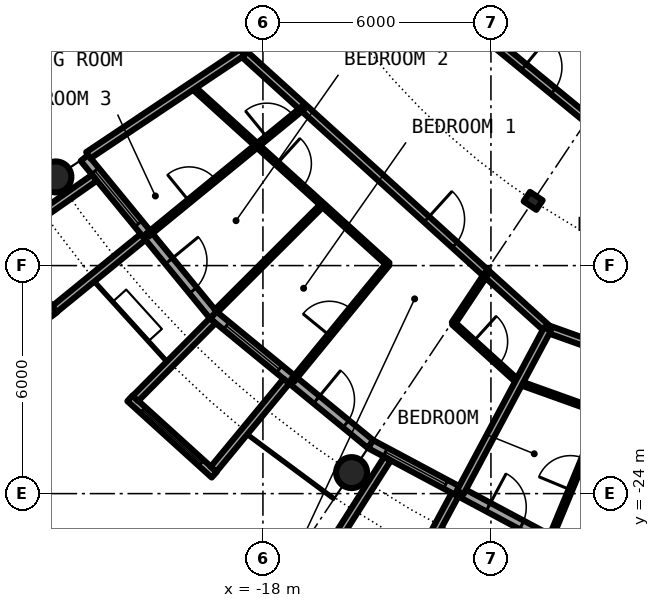
"""IFC4 building model, lengths in metres.
Left out: names, types, materials, properties, quantities, classifications, styles, units other than length and angle.
Written with IfcOpenShell. Run it as: python <this file> out.ifc"""

import sys

from ifc_helpers import new_model, si_unit, direction, frame, frame_2d, origin, origin_2d, place, context, subcontext, project, spatial, rectangle, circle, hollow_circle, i_section, extrude, element, fill, save


model = new_model("IFC4")
c1 = context("Model", 3, precision=1e-05, world=origin(), true_north=direction((0.0, 1.0)))
c2 = subcontext(c1, "Body", "Model", "MODEL_VIEW")
j1 = project(units=[si_unit("LENGTHUNIT", "METRE"), si_unit("PLANEANGLEUNIT", "RADIAN")], contexts=[c1])
p1 = place(None, origin())
s1 = spatial("IfcSite", under=j1, at=p1, CompositionType="ELEMENT")
p2 = place(p1, origin())
s2 = spatial("IfcBuilding", under=s1, at=p2, CompositionType="ELEMENT")
p3 = place(p2, frame((0.0, 0.0, 202.4)))
s3 = spatial("IfcBuildingStorey", under=s2, at=p3, CompositionType="ELEMENT", Elevation=202.4)
for number, where, z_axis, x_axis in (
    (1, (-23.448, -15.667, 0.0), (0.0, 0.0, 1.0), (1.0, 0.0, 0.0)),
    (2, (-15.667, -23.448, 0.0), (0.0, 0.0, 1.0), (1.0, 0.0, 0.0)),
):
    element("IfcColumn", number, at=place(p3, frame(where, z_axis=z_axis, x_axis=x_axis)), inside=s3, PredefinedType="COLUMN", context=c2, shape_type="SweptSolid", body=[
        extrude(hollow_circle(Radius=0.406, WallThickness=0.03, at=origin_2d()), origin(), (0.0, 0.0, 1.0), 3.05),
    ])
p4 = place(p3, frame((-10.889, -16.297, 0.0), z_axis=(0.0, 0.0, 1.0), x_axis=(-0.55557023302, -0.831469612303, 0.0)))
e3 = element("IfcColumn", 3, at=p4, inside=s3, PredefinedType="COLUMN", context=c2, shape_type="SweptSolid", body=[
    extrude(i_section(OverallWidth=0.3, OverallDepth=0.4, WebThickness=0.013, FlangeThickness=0.024, FilletRadius=0.027, at=origin_2d()), origin(), (0.0, 0.0, 1.0), 3.05),
])
p5 = place(p3, frame((-22.699, -15.167, 0.0), z_axis=(0.0, 0.0, 1.0), x_axis=(0.634382322723, -0.773019449054, 0.0)))
e4 = element("IfcWall", 4, at=p5, inside=s3, PredefinedType="SOLIDWALL", context=c2, shape_type="SweptSolid", body=[
    extrude(rectangle(XDim=5.352, YDim=0.25, at=frame_2d((2.676, 0.0))), origin(), (0.0, 0.0, 1.0), 2.7),
])
p6 = place(p5, frame((0.441, 0.0, 0.3)))
e5 = element("IfcOpeningElement", 5, at=p6, cuts=e4, PredefinedType="OPENING", context=c2, shape_type="SweptSolid", body=[
    extrude(rectangle(XDim=1.8, YDim=2.1, at=frame_2d((0.9, 1.05))), frame((0.0, 0.135, 0.0), z_axis=(0.0, -1.0, 0.0), x_axis=(1.0, 0.0, 0.0)), (0.0, 0.0, 1.0), 0.27),
])
p7 = place(p5, frame((3.51, 0.0, 0.0)))
e6 = element("IfcOpeningElement", 6, at=p7, cuts=e4, PredefinedType="OPENING", context=c2, shape_type="SweptSolid", body=[
    extrude(rectangle(XDim=1.0, YDim=2.2, at=frame_2d((0.5, 1.1))), frame((0.0, 0.135, 0.0), z_axis=(0.0, -1.0, 0.0), x_axis=(1.0, 0.0, 0.0)), (0.0, 0.0, 1.0), 0.27),
])
p8 = place(p3, frame((-24.972, -17.337, -0.03), z_axis=(0.0, 0.0, 1.0), x_axis=(0.602806268067, -0.797887588059, 0.0)))
e7 = element("IfcWall", 7, at=p8, inside=s3, PredefinedType="SOLIDWALL", context=c2, shape_type="SweptSolid", body=[
    extrude(rectangle(XDim=2.447, YDim=0.2, at=frame_2d((1.223, 0.0))), origin(), (0.0, 0.0, 1.0), 2.73),
])
p9 = place(p8, frame((0.183, 0.0, 0.33)))
e8 = element("IfcOpeningElement", 8, at=p9, cuts=e7, PredefinedType="OPENING", context=c2, shape_type="SweptSolid", body=[
    extrude(circle(Radius=1.04, at=frame_2d((1.04, 1.04))), frame((0.0, 0.11, 0.0), z_axis=(0.0, -1.0, 0.0), x_axis=(1.0, 0.0, 0.0)), (0.0, 0.0, 1.0), 0.22),
])
p10 = place(p3, frame((-22.433, -15.688, -0.03), z_axis=(0.0, 0.0, 1.0), x_axis=(-0.819373043115, -0.573260687834, 0.0)))
e9 = element("IfcWall", 9, at=p10, inside=s3, PredefinedType="SOLIDWALL", context=c2, shape_type="SweptSolid", body=[
    extrude(rectangle(XDim=2.925, YDim=0.2, at=frame_2d((1.463, 0.0))), origin(), (0.0, 0.0, 1.0), 2.73),
])
p11 = place(p3, frame((-21.155, -17.246, -0.03), z_axis=(0.0, 0.0, 1.0), x_axis=(-0.775179004516, -0.631741648902, 0.0)))
e10 = element("IfcWall", 10, at=p11, inside=s3, PredefinedType="SOLIDWALL", context=c2, shape_type="SweptSolid", body=[
    extrude(rectangle(XDim=3.006, YDim=0.2, at=frame_2d((1.503, 0.0))), origin(), (0.0, 0.0, 1.0), 2.73),
])
p12 = place(p3, frame((-19.304, -19.304, 0.0), z_axis=(0.0, 0.0, 1.0), x_axis=(0.773019449054, -0.634382322723, 0.0)))
e11 = element("IfcWall", 11, at=p12, inside=s3, PredefinedType="SOLIDWALL", context=c2, shape_type="SweptSolid", body=[
    extrude(rectangle(XDim=5.352, YDim=0.25, at=frame_2d((2.676, 0.0))), origin(), (0.0, 0.0, 1.0), 2.7),
])
p13 = place(p12, frame((0.441, 0.0, 0.3)))
e12 = element("IfcOpeningElement", 12, at=p13, cuts=e11, PredefinedType="OPENING", context=c2, shape_type="SweptSolid", body=[
    extrude(rectangle(XDim=1.8, YDim=2.1, at=frame_2d((0.9, 1.05))), frame((0.0, 0.135, 0.0), z_axis=(0.0, -1.0, 0.0), x_axis=(1.0, 0.0, 0.0)), (0.0, 0.0, 1.0), 0.27),
])
p14 = place(p12, frame((3.51, 0.0, 0.0)))
e13 = element("IfcOpeningElement", 13, at=p14, cuts=e11, PredefinedType="OPENING", context=c2, shape_type="SweptSolid", body=[
    extrude(rectangle(XDim=1.0, YDim=2.2, at=frame_2d((0.5, 1.1))), frame((0.0, 0.135, 0.0), z_axis=(0.0, -1.0, 0.0), x_axis=(1.0, 0.0, 0.0)), (0.0, 0.0, 1.0), 0.27),
])
p15 = place(p3, frame((-21.5, -21.493, -0.03), z_axis=(0.0, 0.0, 1.0), x_axis=(0.740998365753, -0.671506829416, 0.0)))
e14 = element("IfcWall", 14, at=p15, inside=s3, PredefinedType="SOLIDWALL", context=c2, shape_type="SweptSolid", body=[
    extrude(rectangle(XDim=2.993, YDim=0.2, at=frame_2d((1.497, 0.0))), origin(), (0.0, 0.0, 1.0), 2.73),
])
p16 = place(p15, frame((0.457, 0.0, 0.33)))
e15 = element("IfcOpeningElement", 15, at=p16, cuts=e14, PredefinedType="OPENING", context=c2, shape_type="SweptSolid", body=[
    extrude(circle(Radius=1.04, at=frame_2d((1.04, 1.04))), frame((0.0, 0.11, 0.0), z_axis=(0.0, -1.0, 0.0), x_axis=(1.0, 0.0, 0.0)), (0.0, 0.0, 1.0), 0.22),
])
p17 = place(p3, frame((-19.323, -19.45, -0.03), z_axis=(0.0, 0.0, 1.0), x_axis=(-0.704476739375, -0.709727076896, 0.0)))
e16 = element("IfcWall", 16, at=p17, inside=s3, PredefinedType="SOLIDWALL", context=c2, shape_type="SweptSolid", body=[
    extrude(rectangle(XDim=2.883, YDim=0.2, at=frame_2d((1.441, 0.0))), origin(), (0.0, 0.0, 1.0), 2.73),
])
p18 = place(p3, frame((-17.384, -21.041, -0.03), z_axis=(0.0, 0.0, 1.0), x_axis=(-0.63709551667, -0.770784861449, 0.0)))
e17 = element("IfcWall", 17, at=p18, inside=s3, PredefinedType="SOLIDWALL", context=c2, shape_type="SweptSolid", body=[
    extrude(rectangle(XDim=3.006, YDim=0.2, at=frame_2d((1.503, 0.0))), origin(), (0.0, 0.0, 1.0), 2.73),
])
p19 = place(p3, frame((-15.167, -22.699, 0.0), z_axis=(0.0, 0.0, 1.0), x_axis=(0.881915646801, -0.471407246368, 0.0)))
e18 = element("IfcWall", 18, at=p19, inside=s3, PredefinedType="SOLIDWALL", context=c2, shape_type="SweptSolid", body=[
    extrude(rectangle(XDim=5.352, YDim=0.25, at=frame_2d((2.676, 0.0))), origin(), (0.0, 0.0, 1.0), 2.7),
])
p20 = place(p19, frame((0.441, 0.0, 0.3)))
e19 = element("IfcOpeningElement", 19, at=p20, cuts=e18, PredefinedType="OPENING", context=c2, shape_type="SweptSolid", body=[
    extrude(rectangle(XDim=1.8, YDim=2.1, at=frame_2d((0.9, 1.05))), frame((0.0, 0.135, 0.0), z_axis=(0.0, -1.0, 0.0), x_axis=(1.0, 0.0, 0.0)), (0.0, 0.0, 1.0), 0.27),
])
p21 = place(p19, frame((3.51, 0.0, 0.0)))
e20 = element("IfcOpeningElement", 20, at=p21, cuts=e18, PredefinedType="OPENING", context=c2, shape_type="SweptSolid", body=[
    extrude(rectangle(XDim=1.0, YDim=2.2, at=frame_2d((0.5, 1.1))), frame((0.0, 0.135, 0.0), z_axis=(0.0, -1.0, 0.0), x_axis=(1.0, 0.0, 0.0)), (0.0, 0.0, 1.0), 0.27),
])
p22 = place(p3, frame((-14.722, -23.079, -0.03), z_axis=(0.0, 0.0, 1.0), x_axis=(-0.537572179146, -0.843217737129, 0.0)))
e21 = element("IfcWall", 21, at=p22, inside=s3, PredefinedType="SOLIDWALL", context=c2, shape_type="SweptSolid", body=[
    extrude(rectangle(XDim=2.924, YDim=0.2, at=frame_2d((1.462, 0.0))), origin(), (0.0, 0.0, 1.0), 2.73),
])
p23 = place(p3, frame((-12.945, -24.029, -0.03), z_axis=(0.0, 0.0, 1.0), x_axis=(-0.474424310775, -0.88029629861, 0.0)))
e22 = element("IfcWall", 22, at=p23, inside=s3, PredefinedType="SOLIDWALL", context=c2, shape_type="SweptSolid", body=[
    extrude(rectangle(XDim=3.006, YDim=0.2, at=frame_2d((1.503, 0.0))), origin(), (0.0, 0.0, 1.0), 2.73),
])
p24 = place(p3, frame((-11.266, -21.078, 0.0), z_axis=(0.0, 0.0, 1.0), x_axis=(0.941477019106, -0.337077175873, 0.0)))
e23 = element("IfcWall", 23, at=p24, inside=s3, PredefinedType="PARTITIONING", context=c2, shape_type="SweptSolid", body=[
    extrude(rectangle(XDim=2.338, YDim=0.1, at=frame_2d((1.169, 0.0))), origin(), (0.0, 0.0, 1.0), 2.7),
])
p25 = place(p3, frame((-19.869, -13.284, 0.0), z_axis=(0.0, 0.0, 1.0), x_axis=(0.741104058203, -0.67139018083, 0.0)))
e24 = element("IfcWall", 24, at=p25, inside=s3, PredefinedType="PARTITIONING", context=c2, shape_type="SweptSolid", body=[
    extrude(rectangle(XDim=6.969, YDim=0.1, at=frame_2d((3.484, 0.0))), origin(), (0.0, 0.0, 1.0), 2.7),
])
p26 = place(p25, frame((3.028, 0.0, 0.0)))
e25 = element("IfcOpeningElement", 25, at=p26, cuts=e24, PredefinedType="OPENING", context=c2, shape_type="SweptSolid", body=[
    extrude(rectangle(XDim=0.9, YDim=2.3, at=frame_2d((0.45, 1.15))), frame((0.0, 0.06, 0.0), z_axis=(0.0, -1.0, 0.0), x_axis=(1.0, 0.0, 0.0)), (0.0, 0.0, 1.0), 0.12),
])
p27 = place(p3, frame((-12.988, -19.518, 0.0), z_axis=(0.0, 0.0, 1.0), x_axis=(0.741132356378, -0.671358942988, 0.0)))
e26 = element("IfcWall", 26, at=p27, inside=s3, PredefinedType="PARTITIONING", context=c2, shape_type="SweptSolid", body=[
    extrude(rectangle(XDim=2.323, YDim=0.1, at=frame_2d((1.162, 0.0))), origin(), (0.0, 0.0, 1.0), 2.7),
])
p28 = place(p27, frame((0.712, 0.0, 0.0)))
e27 = element("IfcOpeningElement", 27, at=p28, cuts=e26, PredefinedType="OPENING", context=c2, shape_type="SweptSolid", body=[
    extrude(rectangle(XDim=0.9, YDim=2.3, at=frame_2d((0.45, 1.15))), frame((0.0, 0.06, 0.0), z_axis=(0.0, -1.0, 0.0), x_axis=(1.0, 0.0, 0.0)), (0.0, 0.0, 1.0), 0.12),
])
p29 = place(p3, frame((-19.317, -10.915, 0.0), z_axis=(0.0, 0.0, 1.0), x_axis=(0.465359652486, -0.885121683068, 0.0)))
e28 = element("IfcWall", 28, at=p29, inside=s3, PredefinedType="PARTITIONING", context=c2, shape_type="SweptSolid", body=[
    extrude(rectangle(XDim=1.665, YDim=0.2, at=frame_2d((0.833, 0.0))), origin(), (0.0, 0.0, 1.0), 2.7),
])
p30 = place(p3, frame((-10.512, -19.667, 0.0), z_axis=(0.0, 0.0, 1.0), x_axis=(0.941518972512, -0.336959974478, 0.0)))
e29 = element("IfcWall", 29, at=p30, inside=s3, PredefinedType="PARTITIONING", context=c2, shape_type="SweptSolid", body=[
    extrude(rectangle(XDim=6.547, YDim=0.2, at=frame_2d((3.273, 0.0))), origin(), (0.0, 0.0, 1.0), 2.7),
])
p31 = place(p30, frame((1.682, 0.0, 0.0)))
e30 = element("IfcOpeningElement", 30, at=p31, cuts=e29, PredefinedType="OPENING", context=c2, shape_type="SweptSolid", body=[
    extrude(rectangle(XDim=1.0, YDim=2.3, at=frame_2d((0.5, 1.15))), frame((0.0, 0.11, 0.0), z_axis=(0.0, -1.0, 0.0), x_axis=(1.0, 0.0, 0.0)), (0.0, 0.0, 1.0), 0.22),
])
p32 = place(p3, frame((-18.542, -12.389, 0.0), z_axis=(0.0, 0.0, 1.0), x_axis=(0.74093897184, -0.671572363941, 0.0)))
e31 = element("IfcWall", 31, at=p32, inside=s3, PredefinedType="PARTITIONING", context=c2, shape_type="SweptSolid", body=[
    extrude(rectangle(XDim=10.84, YDim=0.2, at=frame_2d((5.42, 0.0))), origin(), (0.0, 0.0, 1.0), 2.7),
])
p33 = place(p32, frame((6.544, 0.0, 0.0)))
e32 = element("IfcOpeningElement", 32, at=p33, cuts=e31, PredefinedType="OPENING", context=c2, shape_type="SweptSolid", body=[
    extrude(rectangle(XDim=1.0, YDim=2.3, at=frame_2d((0.5, 1.15))), frame((0.0, 0.11, 0.0), z_axis=(0.0, -1.0, 0.0), x_axis=(1.0, 0.0, 0.0)), (0.0, 0.0, 1.0), 0.22),
])
p34 = place(p3, frame((-14.717, -9.834, 0.0), z_axis=(0.0, 0.0, 1.0), x_axis=(0.773034536097, -0.634363938131, 0.0)))
e33 = element("IfcWall", 33, at=p34, inside=s3, PredefinedType="PARTITIONING", context=c2, shape_type="SweptSolid", body=[
    extrude(rectangle(XDim=10.277, YDim=0.2, at=frame_2d((5.138, 0.0))), origin(), (0.0, 0.0, 1.0), 2.7),
])
p35 = place(p34, frame((4.638, 0.0, 0.0)))
e34 = element("IfcOpeningElement", 34, at=p35, cuts=e33, PredefinedType="OPENING", context=c2, shape_type="SweptSolid", body=[
    extrude(rectangle(XDim=1.0, YDim=2.3, at=frame_2d((0.5, 1.15))), frame((0.0, 0.11, 0.0), z_axis=(0.0, -1.0, 0.0), x_axis=(1.0, 0.0, 0.0)), (0.0, 0.0, 1.0), 0.22),
])
p36 = place(p3, frame((-22.595, -15.098, 0.0), z_axis=(0.0, 0.0, 1.0), x_axis=(0.831387096605, 0.55569370664, 0.0)))
e35 = element("IfcWall", 35, at=p36, inside=s3, PredefinedType="PARTITIONING", context=c2, shape_type="SweptSolid", body=[
    extrude(rectangle(XDim=4.875, YDim=0.2, at=frame_2d((2.438, 0.0))), origin(), (0.0, 0.0, 1.0), 2.7),
])
p37 = place(p3, frame((-21.04, -17.199, 0.0), z_axis=(0.0, 0.0, 1.0), x_axis=(0.774310172558, 0.632806255241, 0.0)))
e36 = element("IfcWall", 36, at=p37, inside=s3, PredefinedType="PARTITIONING", context=c2, shape_type="SweptSolid", body=[
    extrude(rectangle(XDim=5.3, YDim=0.1, at=frame_2d((2.65, 0.0))), origin(), (0.0, 0.0, 1.0), 2.7),
])
p38 = place(p37, frame((4.066, 0.0, 0.0)))
e37 = element("IfcOpeningElement", 37, at=p38, cuts=e36, PredefinedType="OPENING", context=c2, shape_type="SweptSolid", body=[
    extrude(rectangle(XDim=0.9, YDim=2.3, at=frame_2d((0.45, 1.15))), frame((0.0, 0.06, 0.0), z_axis=(0.0, -1.0, 0.0), x_axis=(1.0, 0.0, 0.0)), (0.0, 0.0, 1.0), 0.12),
])
p39 = place(p37, frame((1.416, 0.0, 0.0)))
e38 = element("IfcOpeningElement", 38, at=p39, cuts=e36, PredefinedType="OPENING", context=c2, shape_type="SweptSolid", body=[
    extrude(rectangle(XDim=0.9, YDim=2.3, at=frame_2d((0.45, 1.15))), frame((0.0, 0.06, 0.0), z_axis=(0.0, -1.0, 0.0), x_axis=(1.0, 0.0, 0.0)), (0.0, 0.0, 1.0), 0.12),
])
p40 = place(p3, frame((-19.234, -19.197, 0.0), z_axis=(0.0, 0.0, 1.0), x_axis=(0.707722727509, 0.706490297858, 0.0)))
e39 = element("IfcWall", 39, at=p40, inside=s3, PredefinedType="PARTITIONING", context=c2, shape_type="SweptSolid", body=[
    extrude(rectangle(XDim=3.962, YDim=0.1, at=frame_2d((1.981, 0.0))), origin(), (0.0, 0.0, 1.0), 2.7),
])
p41 = place(p3, frame((-17.219, -21.023, 0.0), z_axis=(0.0, 0.0, 1.0), x_axis=(0.633590098448, 0.773668913133, 0.0)))
e40 = element("IfcWall", 40, at=p41, inside=s3, PredefinedType="PARTITIONING", context=c2, shape_type="SweptSolid", body=[
    extrude(rectangle(XDim=3.962, YDim=0.1, at=frame_2d((1.981, 0.0))), origin(), (0.0, 0.0, 1.0), 2.7),
])
p42 = place(p41, frame((1.531, 0.0, 0.0)))
e41 = element("IfcOpeningElement", 41, at=p42, cuts=e40, PredefinedType="OPENING", context=c2, shape_type="SweptSolid", body=[
    extrude(rectangle(XDim=0.9, YDim=2.3, at=frame_2d((0.45, 1.15))), frame((0.0, 0.06, 0.0), z_axis=(0.0, -1.0, 0.0), x_axis=(1.0, 0.0, 0.0)), (0.0, 0.0, 1.0), 0.12),
])
p43 = place(p3, frame((-12.988, -19.518, 0.0), z_axis=(0.0, 0.0, 1.0), x_axis=(0.554125989098, 0.832432813028, 0.0)))
e42 = element("IfcWall", 42, at=p43, inside=s3, PredefinedType="PARTITIONING", context=c2, shape_type="SweptSolid", body=[
    extrude(rectangle(XDim=1.57, YDim=0.1, at=frame_2d((0.785, 0.0))), origin(), (0.0, 0.0, 1.0), 2.7),
])
p44 = place(p3, frame((-12.809, -23.967, 0.0), z_axis=(0.0, 0.0, 1.0), x_axis=(0.471427642527, 0.881904744211, 0.0)))
e43 = element("IfcWall", 43, at=p44, inside=s3, PredefinedType="PARTITIONING", context=c2, shape_type="SweptSolid", body=[
    extrude(rectangle(XDim=4.875, YDim=0.2, at=frame_2d((2.438, 0.0))), origin(), (0.0, 0.0, 1.0), 2.7),
])
p45 = place(p3, frame((-10.407, -25.103, 0.0), z_axis=(0.0, 0.0, 1.0), x_axis=(0.382977322646, 0.9237577444, 0.0)))
e44 = element("IfcWall", 44, at=p45, inside=s3, PredefinedType="PARTITIONING", context=c2, shape_type="SweptSolid", body=[
    extrude(rectangle(XDim=3.504, YDim=0.1, at=frame_2d((1.752, 0.0))), origin(), (0.0, 0.0, 1.0), 2.7),
])
p46 = place(p45, frame((1.302, 0.0, 0.0)))
e45 = element("IfcOpeningElement", 45, at=p46, cuts=e44, PredefinedType="OPENING", context=c2, shape_type="SweptSolid", body=[
    extrude(rectangle(XDim=0.9, YDim=2.3, at=frame_2d((0.45, 1.15))), frame((0.0, 0.06, 0.0), z_axis=(0.0, -1.0, 0.0), x_axis=(1.0, 0.0, 0.0)), (0.0, 0.0, 1.0), 0.12),
])
p47 = place(p6, origin())
e46 = element("IfcWindow", 46, at=p47, inside=s3, PartitioningType="SINGLE_PANEL", PredefinedType="WINDOW", context=c2, shape_type="SweptSolid", body=[
    extrude(rectangle(XDim=1.8, YDim=2.1, at=frame_2d((0.9, 1.05))), frame((0.0, 0.03, 0.0), z_axis=(0.0, -1.0, 0.0), x_axis=(1.0, 0.0, 0.0)), (0.0, 0.0, 1.0), 0.06),
])
fill(e5, e46)
p48 = place(p7, origin())
e47 = element("IfcDoor", 47, at=p48, inside=s3, OperationType="SINGLE_SWING_LEFT", PredefinedType="DOOR", context=c2, shape_type="SweptSolid", body=[
    extrude(rectangle(XDim=1.0, YDim=2.2, at=frame_2d((0.5, 1.1))), frame((0.0, 0.025, 0.0), z_axis=(0.0, -1.0, 0.0), x_axis=(1.0, 0.0, 0.0)), (0.0, 0.0, 1.0), 0.05),
])
fill(e6, e47)
p49 = place(p13, origin())
e48 = element("IfcWindow", 48, at=p49, inside=s3, PartitioningType="SINGLE_PANEL", PredefinedType="WINDOW", context=c2, shape_type="SweptSolid", body=[
    extrude(rectangle(XDim=1.8, YDim=2.1, at=frame_2d((0.9, 1.05))), frame((0.0, 0.03, 0.0), z_axis=(0.0, -1.0, 0.0), x_axis=(1.0, 0.0, 0.0)), (0.0, 0.0, 1.0), 0.06),
])
fill(e12, e48)
p50 = place(p16, origin())
e49 = element("IfcWindow", 49, at=p50, inside=s3, PartitioningType="SINGLE_PANEL", PredefinedType="WINDOW", context=c2, shape_type="SweptSolid", body=[
    extrude(circle(Radius=1.04, at=frame_2d((1.04, 1.04))), frame((0.0, 0.03, 0.0), z_axis=(0.0, -1.0, 0.0), x_axis=(1.0, 0.0, 0.0)), (0.0, 0.0, 1.0), 0.06),
])
fill(e15, e49)
p51 = place(p14, origin())
e50 = element("IfcDoor", 50, at=p51, inside=s3, OperationType="SINGLE_SWING_LEFT", PredefinedType="DOOR", context=c2, shape_type="SweptSolid", body=[
    extrude(rectangle(XDim=1.0, YDim=2.2, at=frame_2d((0.5, 1.1))), frame((0.0, 0.025, 0.0), z_axis=(0.0, -1.0, 0.0), x_axis=(1.0, 0.0, 0.0)), (0.0, 0.0, 1.0), 0.05),
])
fill(e13, e50)
p52 = place(p20, origin())
e51 = element("IfcWindow", 51, at=p52, inside=s3, PartitioningType="SINGLE_PANEL", PredefinedType="WINDOW", context=c2, shape_type="SweptSolid", body=[
    extrude(rectangle(XDim=1.8, YDim=2.1, at=frame_2d((0.9, 1.05))), frame((0.0, 0.03, 0.0), z_axis=(0.0, -1.0, 0.0), x_axis=(1.0, 0.0, 0.0)), (0.0, 0.0, 1.0), 0.06),
])
fill(e19, e51)
p53 = place(p21, origin())
e52 = element("IfcDoor", 52, at=p53, inside=s3, OperationType="SINGLE_SWING_LEFT", PredefinedType="DOOR", context=c2, shape_type="SweptSolid", body=[
    extrude(rectangle(XDim=1.0, YDim=2.2, at=frame_2d((0.5, 1.1))), frame((0.0, 0.025, 0.0), z_axis=(0.0, -1.0, 0.0), x_axis=(1.0, 0.0, 0.0)), (0.0, 0.0, 1.0), 0.05),
])
fill(e20, e52)
p54 = place(p33, origin())
e53 = element("IfcDoor", 53, at=p54, inside=s3, OperationType="SINGLE_SWING_RIGHT", PredefinedType="DOOR", context=c2, shape_type="SweptSolid", body=[
    extrude(rectangle(XDim=1.0, YDim=2.3, at=frame_2d((0.5, 1.15))), frame((0.0, 0.025, 0.0), z_axis=(0.0, -1.0, 0.0), x_axis=(1.0, 0.0, 0.0)), (0.0, 0.0, 1.0), 0.05),
])
fill(e32, e53)
p55 = place(p28, origin())
e54 = element("IfcDoor", 54, at=p55, inside=s3, OperationType="SINGLE_SWING_RIGHT", PredefinedType="DOOR", context=c2, shape_type="SweptSolid", body=[
    extrude(rectangle(XDim=0.9, YDim=2.3, at=frame_2d((0.45, 1.15))), frame((0.0, 0.025, 0.0), z_axis=(0.0, -1.0, 0.0), x_axis=(1.0, 0.0, 0.0)), (0.0, 0.0, 1.0), 0.05),
])
fill(e27, e54)
p56 = place(p38, origin())
e55 = element("IfcDoor", 55, at=p56, inside=s3, OperationType="SINGLE_SWING_RIGHT", PredefinedType="DOOR", context=c2, shape_type="SweptSolid", body=[
    extrude(rectangle(XDim=0.9, YDim=2.3, at=frame_2d((0.45, 1.15))), frame((0.0, 0.025, 0.0), z_axis=(0.0, -1.0, 0.0), x_axis=(1.0, 0.0, 0.0)), (0.0, 0.0, 1.0), 0.05),
])
fill(e37, e55)
p57 = place(p42, origin())
e56 = element("IfcDoor", 56, at=p57, inside=s3, OperationType="SINGLE_SWING_LEFT", PredefinedType="DOOR", context=c2, shape_type="SweptSolid", body=[
    extrude(rectangle(XDim=0.9, YDim=2.3, at=frame_2d((0.45, 1.15))), frame((0.0, 0.025, 0.0), z_axis=(0.0, -1.0, 0.0), x_axis=(1.0, 0.0, 0.0)), (0.0, 0.0, 1.0), 0.05),
])
fill(e41, e56)
p58 = place(p26, origin())
e57 = element("IfcDoor", 57, at=p58, inside=s3, OperationType="SINGLE_SWING_LEFT", PredefinedType="DOOR", context=c2, shape_type="SweptSolid", body=[
    extrude(rectangle(XDim=0.9, YDim=2.3, at=frame_2d((0.45, 1.15))), frame((0.0, 0.025, 0.0), z_axis=(0.0, -1.0, 0.0), x_axis=(1.0, 0.0, 0.0)), (0.0, 0.0, 1.0), 0.05),
])
fill(e25, e57)
p59 = place(p39, origin())
e58 = element("IfcDoor", 58, at=p59, inside=s3, OperationType="SINGLE_SWING_LEFT", PredefinedType="DOOR", context=c2, shape_type="SweptSolid", body=[
    extrude(rectangle(XDim=0.9, YDim=2.3, at=frame_2d((0.45, 1.15))), frame((0.0, 0.025, 0.0), z_axis=(0.0, -1.0, 0.0), x_axis=(1.0, 0.0, 0.0)), (0.0, 0.0, 1.0), 0.05),
])
fill(e38, e58)
p60 = place(p46, origin())
e59 = element("IfcDoor", 59, at=p60, inside=s3, OperationType="SINGLE_SWING_LEFT", PredefinedType="DOOR", context=c2, shape_type="SweptSolid", body=[
    extrude(rectangle(XDim=0.9, YDim=2.3, at=frame_2d((0.45, 1.15))), frame((0.0, 0.025, 0.0), z_axis=(0.0, -1.0, 0.0), x_axis=(1.0, 0.0, 0.0)), (0.0, 0.0, 1.0), 0.05),
])
fill(e45, e59)
p61 = place(p35, origin())
e60 = element("IfcDoor", 60, at=p61, inside=s3, OperationType="SINGLE_SWING_LEFT", PredefinedType="DOOR", context=c2, shape_type="SweptSolid", body=[
    extrude(rectangle(XDim=1.0, YDim=2.3, at=frame_2d((0.5, 1.15))), frame((0.0, 0.025, 0.0), z_axis=(0.0, -1.0, 0.0), x_axis=(1.0, 0.0, 0.0)), (0.0, 0.0, 1.0), 0.05),
])
fill(e34, e60)
save(model, sys.argv[1])
